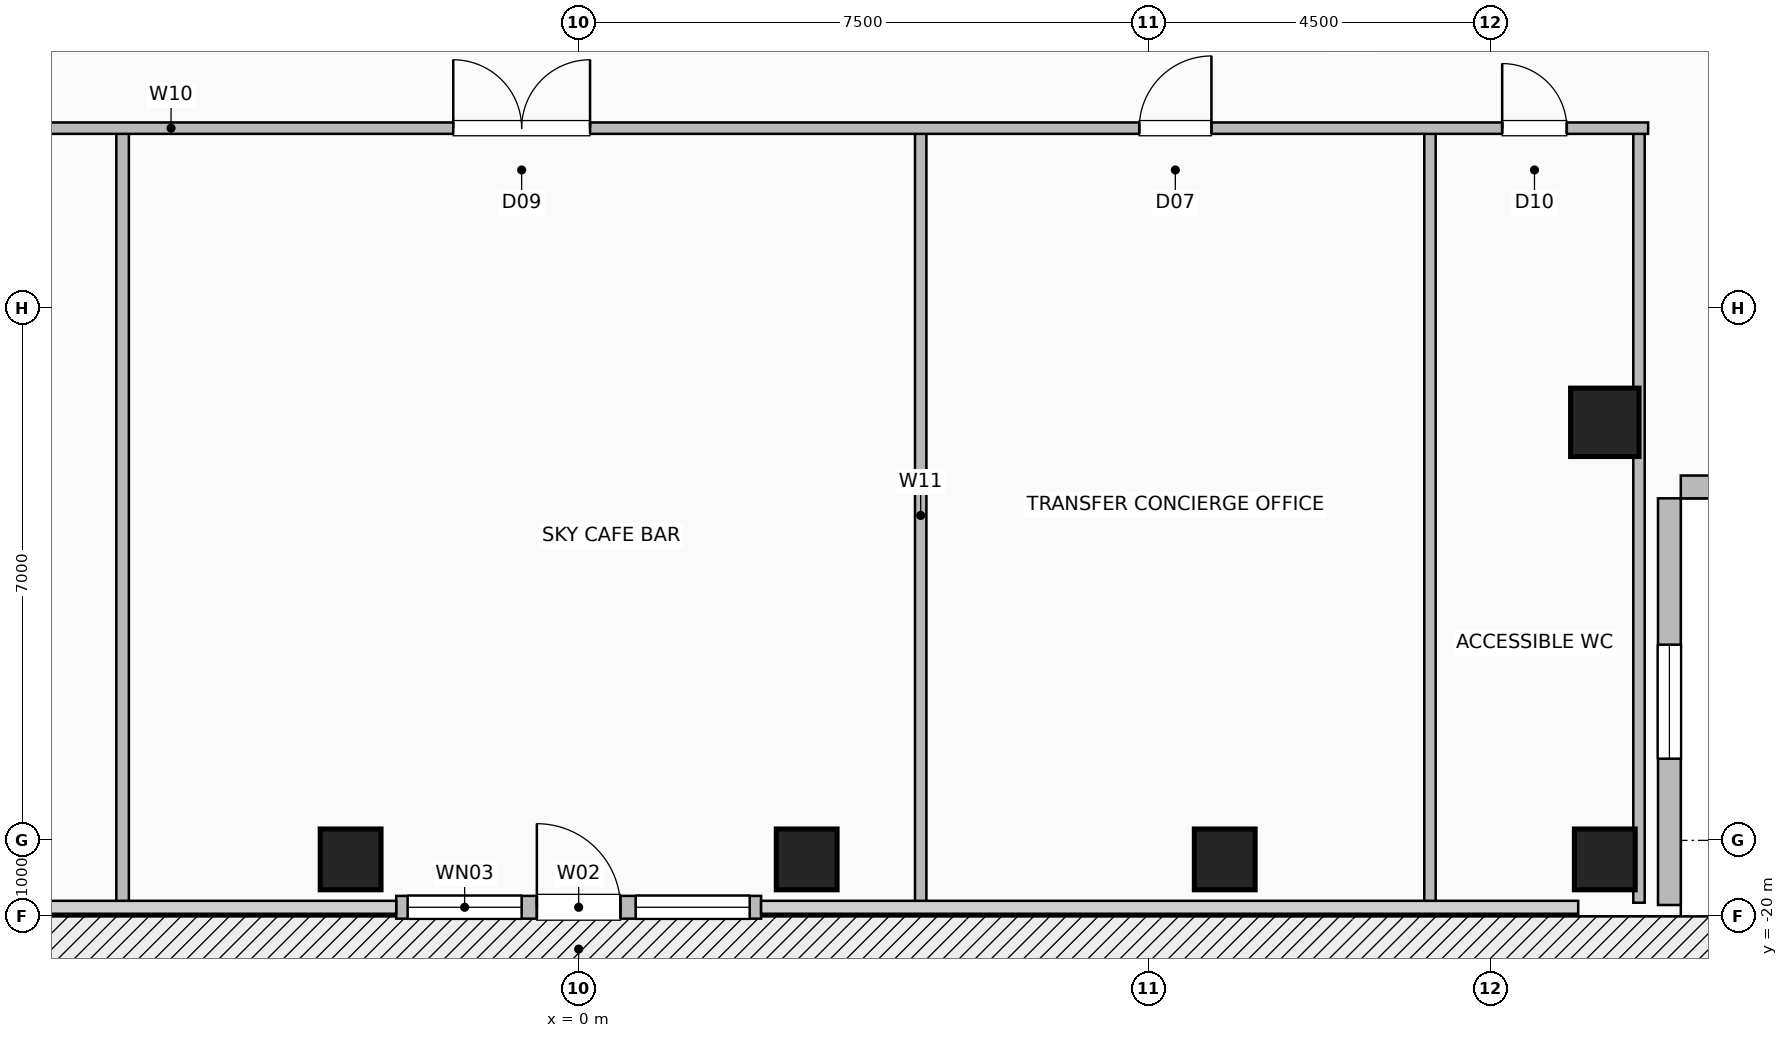
"""IFC4 building model, lengths in metres.
Left out: names, types, materials, properties, quantities, classifications, styles, units other than length and angle.
Written with IfcOpenShell. Run it as: python <this file> out.ifc"""

import sys

from ifc_helpers import new_model, si_unit, direction, frame, frame_2d, origin, origin_2d, place, context, subcontext, project, spatial, rectangle, hollow_rectangle, extrude, element, fill, save


model = new_model("IFC4")
c1 = context("Model", 3, precision=1e-05, world=origin(), true_north=direction((0.0, 1.0)))
c2 = subcontext(c1, "Body", "Model", "MODEL_VIEW")
j1 = project(units=[si_unit("LENGTHUNIT", "METRE"), si_unit("PLANEANGLEUNIT", "RADIAN")], contexts=[c1])
p1 = place(None, origin())
s1 = spatial("IfcSite", under=j1, at=p1, CompositionType="ELEMENT")
p2 = place(p1, origin())
s2 = spatial("IfcBuilding", under=s1, at=p2, CompositionType="ELEMENT")
p3 = place(p2, frame((0.0, 0.0, 166.2)))
s3 = spatial("IfcBuildingStorey", under=s2, at=p3, CompositionType="ELEMENT", Elevation=166.2)
for number, where, z_axis, x_axis in (
    (1, (-3.0, -19.25, -0.4), (0.0, 0.0, 1.0), (1.0, 0.0, 0.0)),
    (2, (3.0, -19.25, -0.4), (0.0, 0.0, 1.0), (1.0, 0.0, 0.0)),
    (3, (8.5, -19.25, -0.4), (0.0, 0.0, 1.0), (1.0, 0.0, 0.0)),
    (4, (13.5, -19.25, -0.4), (0.0, 0.0, 1.0), (1.0, 0.0, 0.0)),
):
    element("IfcColumn", number, at=place(p3, frame(where, z_axis=z_axis, x_axis=x_axis)), inside=s3, PredefinedType="COLUMN", context=c2, shape_type="SweptSolid", body=[
        extrude(hollow_rectangle(XDim=0.8, YDim=0.8, WallThickness=0.04, at=origin_2d()), origin(), (0.0, 0.0, 1.0), 4.0),
    ])
p4 = place(p3, frame((13.5, -13.5, -0.4), z_axis=(0.0, 0.0, 1.0), x_axis=(1.0, 0.0, 0.0)))
e5 = element("IfcColumn", 5, at=p4, inside=s3, PredefinedType="COLUMN", context=c2, shape_type="SweptSolid", body=[
    extrude(hollow_rectangle(XDim=0.9, YDim=0.9, WallThickness=0.045, at=origin_2d()), origin(), (0.0, 0.0, 1.0), 4.0),
])
p5 = place(p3, frame((-2.4, -19.88, 0.0), z_axis=(0.0, 0.0, 1.0), x_axis=(1.0, 0.0, 0.0)))
e6 = element("IfcWall", 6, at=p5, inside=s3, PredefinedType="SOLIDWALL", context=c2, shape_type="SweptSolid", body=[
    extrude(rectangle(XDim=4.8, YDim=0.3, at=frame_2d((2.4, 0.0))), origin(), (0.0, 0.0, 1.0), 3.36),
])
p6 = place(p5, frame((1.85, 0.0, 0.0)))
e7 = element("IfcOpeningElement", 7, at=p6, cuts=e6, PredefinedType="OPENING", context=c2, shape_type="SweptSolid", body=[
    extrude(rectangle(XDim=1.1, YDim=2.2, at=frame_2d((0.55, 1.1))), frame((0.0, 0.16, 0.0), z_axis=(0.0, -1.0, 0.0), x_axis=(1.0, 0.0, 0.0)), (0.0, 0.0, 1.0), 0.32),
])
p7 = place(p5, frame((0.15, 0.0, 0.85)))
e8 = element("IfcOpeningElement", 8, at=p7, cuts=e6, PredefinedType="OPENING", context=c2, shape_type="SweptSolid", body=[
    extrude(rectangle(XDim=1.5, YDim=1.8, at=frame_2d((0.75, 0.9))), frame((0.0, 0.16, 0.0), z_axis=(0.0, -1.0, 0.0), x_axis=(1.0, 0.0, 0.0)), (0.0, 0.0, 1.0), 0.32),
])
p8 = place(p5, frame((3.15, 0.0, 0.85)))
e9 = element("IfcOpeningElement", 9, at=p8, cuts=e6, PredefinedType="OPENING", context=c2, shape_type="SweptSolid", body=[
    extrude(rectangle(XDim=1.5, YDim=1.8, at=frame_2d((0.75, 0.9))), frame((0.0, 0.16, 0.0), z_axis=(0.0, -1.0, 0.0), x_axis=(1.0, 0.0, 0.0)), (0.0, 0.0, 1.0), 0.32),
])
p9 = place(p3, frame((14.35, -19.85, 0.0), z_axis=(0.0, 0.0, 1.0), x_axis=(0.0, 1.0, 0.0)))
e10 = element("IfcWall", 10, at=p9, inside=s3, PredefinedType="SOLIDWALL", context=c2, shape_type="SweptSolid", body=[
    extrude(rectangle(XDim=5.35, YDim=0.3, at=frame_2d((2.675, 0.0))), origin(), (0.0, 0.0, 1.0), 3.36),
])
p10 = place(p9, frame((1.925, 0.0, 0.9)))
e11 = element("IfcOpeningElement", 11, at=p10, cuts=e10, PredefinedType="OPENING", context=c2, shape_type="SweptSolid", body=[
    extrude(rectangle(XDim=1.5, YDim=1.8, at=frame_2d((0.75, 0.9))), frame((0.0, 0.16, 0.0), z_axis=(0.0, -1.0, 0.0), x_axis=(1.0, 0.0, 0.0)), (0.0, 0.0, 1.0), 0.32),
])
p11 = place(p3, frame((19.85, -14.35, 0.0), z_axis=(0.0, 0.0, 1.0), x_axis=(-1.0, 0.0, 0.0)))
e12 = element("IfcWall", 12, at=p11, inside=s3, PredefinedType="SOLIDWALL", context=c2, shape_type="SweptSolid", body=[
    extrude(rectangle(XDim=5.35, YDim=0.3, at=frame_2d((2.675, 0.0))), origin(), (0.0, 0.0, 1.0), 3.36),
])
p12 = place(p3, frame((-6.0, -19.82, 0.0), z_axis=(0.0, 0.0, 1.0), x_axis=(0.0, 1.0, 0.0)))
e13 = element("IfcWall", 13, at=p12, inside=s3, PredefinedType="PLUMBINGWALL", context=c2, shape_type="SweptSolid", body=[
    extrude(rectangle(XDim=10.19, YDim=0.165, at=frame_2d((5.095, 0.0))), origin(), (0.0, 0.0, 1.0), 3.36),
])
for number, where, z_axis, x_axis in (
    (14, (4.5, -19.82, 0.0), (0.0, 0.0, 1.0), (0.0, 1.0, 0.0)),
    (15, (11.2, -19.82, 0.0), (0.0, 0.0, 1.0), (0.0, 1.0, 0.0)),
    (16, (13.95, -19.82, 0.0), (0.0, 0.0, 1.0), (0.0, 1.0, 0.0)),
):
    element("IfcWall", number, at=place(p3, frame(where, z_axis=z_axis, x_axis=x_axis)), inside=s3, PredefinedType="PARTITIONING", context=c2, shape_type="SweptSolid", body=[
        extrude(rectangle(XDim=10.19, YDim=0.15, at=frame_2d((5.095, 0.0))), origin(), (0.0, 0.0, 1.0), 3.36),
    ])
p13 = place(p3, frame((-14.07, -9.63, 0.0), z_axis=(0.0, 0.0, 1.0), x_axis=(1.0, 0.0, 0.0)))
e17 = element("IfcWall", 17, at=p13, inside=s3, PredefinedType="PARTITIONING", context=c2, shape_type="SweptSolid", body=[
    extrude(rectangle(XDim=28.14, YDim=0.15, at=frame_2d((14.07, 0.0))), origin(), (0.0, 0.0, 1.0), 3.36),
])
p14 = place(p13, frame((3.195, 0.0, 0.0)))
e18 = element("IfcOpeningElement", 18, at=p14, cuts=e17, PredefinedType="OPENING", context=c2, shape_type="SweptSolid", body=[
    extrude(rectangle(XDim=1.8, YDim=2.08, at=frame_2d((0.9, 1.04))), frame((0.0, 0.085, 0.0), z_axis=(0.0, -1.0, 0.0), x_axis=(1.0, 0.0, 0.0)), (0.0, 0.0, 1.0), 0.17),
])
p15 = place(p13, frame((12.42, 0.0, 0.0)))
e19 = element("IfcOpeningElement", 19, at=p15, cuts=e17, PredefinedType="OPENING", context=c2, shape_type="SweptSolid", body=[
    extrude(rectangle(XDim=1.8, YDim=2.08, at=frame_2d((0.9, 1.04))), frame((0.0, 0.085, 0.0), z_axis=(0.0, -1.0, 0.0), x_axis=(1.0, 0.0, 0.0)), (0.0, 0.0, 1.0), 0.17),
])
p16 = place(p13, frame((21.445, 0.0, 0.0)))
e20 = element("IfcOpeningElement", 20, at=p16, cuts=e17, PredefinedType="OPENING", context=c2, shape_type="SweptSolid", body=[
    extrude(rectangle(XDim=0.95, YDim=2.06, at=frame_2d((0.475, 1.03))), frame((0.0, 0.085, 0.0), z_axis=(0.0, -1.0, 0.0), x_axis=(1.0, 0.0, 0.0)), (0.0, 0.0, 1.0), 0.17),
])
p17 = place(p13, frame((26.22, 0.0, 0.0)))
e21 = element("IfcOpeningElement", 21, at=p17, cuts=e17, PredefinedType="OPENING", context=c2, shape_type="SweptSolid", body=[
    extrude(rectangle(XDim=0.85, YDim=2.05, at=frame_2d((0.425, 1.025))), frame((0.0, 0.085, 0.0), z_axis=(0.0, -1.0, 0.0), x_axis=(1.0, 0.0, 0.0)), (0.0, 0.0, 1.0), 0.17),
])
p18 = place(p6, origin())
e22 = element("IfcDoor", 22, at=p18, inside=s3, OperationType="SINGLE_SWING_LEFT", PredefinedType="DOOR", context=c2, shape_type="SweptSolid", body=[
    extrude(rectangle(XDim=1.1, YDim=2.2, at=frame_2d((0.55, 1.1))), frame((0.0, 0.025, 0.0), z_axis=(0.0, -1.0, 0.0), x_axis=(1.0, 0.0, 0.0)), (0.0, 0.0, 1.0), 0.05),
])
fill(e7, e22)
p19 = place(p7, origin())
e23 = element("IfcWindow", 23, at=p19, inside=s3, PartitioningType="SINGLE_PANEL", PredefinedType="WINDOW", context=c2, shape_type="SweptSolid", body=[
    extrude(rectangle(XDim=1.5, YDim=1.8, at=frame_2d((0.75, 0.9))), frame((0.0, 0.03, 0.0), z_axis=(0.0, -1.0, 0.0), x_axis=(1.0, 0.0, 0.0)), (0.0, 0.0, 1.0), 0.06),
])
fill(e8, e23)
p20 = place(p8, origin())
e24 = element("IfcWindow", 24, at=p20, inside=s3, PartitioningType="SINGLE_PANEL", PredefinedType="WINDOW", context=c2, shape_type="SweptSolid", body=[
    extrude(rectangle(XDim=1.5, YDim=1.8, at=frame_2d((0.75, 0.9))), frame((0.0, 0.03, 0.0), z_axis=(0.0, -1.0, 0.0), x_axis=(1.0, 0.0, 0.0)), (0.0, 0.0, 1.0), 0.06),
])
fill(e9, e24)
p21 = place(p10, origin())
e25 = element("IfcWindow", 25, at=p21, inside=s3, PartitioningType="SINGLE_PANEL", PredefinedType="WINDOW", context=c2, shape_type="SweptSolid", body=[
    extrude(rectangle(XDim=1.5, YDim=1.8, at=frame_2d((0.75, 0.9))), frame((0.0, 0.03, 0.0), z_axis=(0.0, -1.0, 0.0), x_axis=(1.0, 0.0, 0.0)), (0.0, 0.0, 1.0), 0.06),
])
fill(e11, e25)
p22 = place(p15, origin())
e26 = element("IfcDoor", 26, at=p22, inside=s3, OperationType="DOUBLE_DOOR_SINGLE_SWING", PredefinedType="DOOR", context=c2, shape_type="SweptSolid", body=[
    extrude(rectangle(XDim=1.8, YDim=2.08, at=frame_2d((0.9, 1.04))), frame((0.0, 0.025, 0.0), z_axis=(0.0, -1.0, 0.0), x_axis=(1.0, 0.0, 0.0)), (0.0, 0.0, 1.0), 0.05),
])
fill(e19, e26)
p23 = place(p16, origin())
e27 = element("IfcDoor", 27, at=p23, inside=s3, OperationType="SINGLE_SWING_RIGHT", PredefinedType="DOOR", context=c2, shape_type="SweptSolid", body=[
    extrude(rectangle(XDim=0.95, YDim=2.06, at=frame_2d((0.475, 1.03))), frame((0.0, 0.025, 0.0), z_axis=(0.0, -1.0, 0.0), x_axis=(1.0, 0.0, 0.0)), (0.0, 0.0, 1.0), 0.05),
])
fill(e20, e27)
p24 = place(p17, origin())
e28 = element("IfcDoor", 28, at=p24, inside=s3, OperationType="SINGLE_SWING_LEFT", PredefinedType="DOOR", context=c2, shape_type="SweptSolid", body=[
    extrude(rectangle(XDim=0.85, YDim=2.05, at=frame_2d((0.425, 1.025))), frame((0.0, 0.025, 0.0), z_axis=(0.0, -1.0, 0.0), x_axis=(1.0, 0.0, 0.0)), (0.0, 0.0, 1.0), 0.05),
])
fill(e21, e28)
save(model, sys.argv[1])
